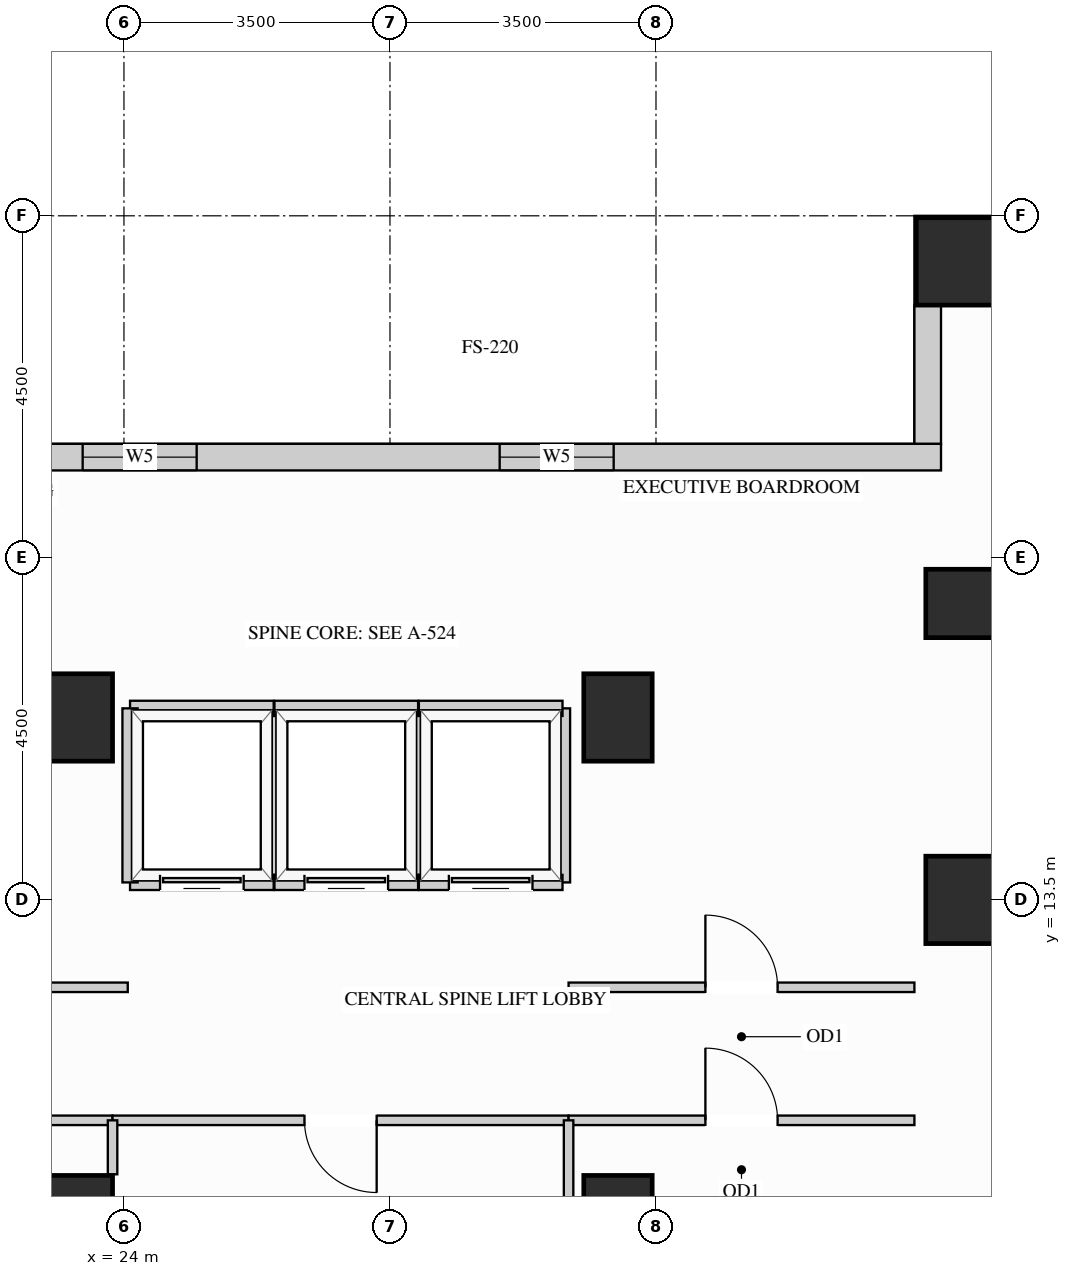
"""IFC4 building model, lengths in metres.
Left out: names, types, materials, properties, quantities, classifications, styles, units other than length and angle.
Written with IfcOpenShell. Run it as: python <this file> out.ifc"""

import sys

from ifc_helpers import new_model, si_unit, direction, frame, frame_2d, origin, origin_2d, place, context, subcontext, project, spatial, rectangle, extrude, source, transform, mapped, element, fill, save


model = new_model("IFC4")
c1 = context("Model", 3, precision=1e-05, world=origin(), true_north=direction((0.0, 1.0)))
c2 = subcontext(c1, "Body", "Model", "MODEL_VIEW")
j1 = project(units=[si_unit("LENGTHUNIT", "METRE"), si_unit("PLANEANGLEUNIT", "RADIAN")], contexts=[c1])
p1 = place(None, origin())
s1 = spatial("IfcSite", under=j1, at=p1, CompositionType="ELEMENT")
p2 = place(p1, origin())
s2 = spatial("IfcBuilding", under=s1, at=p2, CompositionType="ELEMENT")
p3 = place(p2, frame((0.0, 0.0, 113.4)))
s3 = spatial("IfcBuildingStorey", under=s2, at=p3, CompositionType="ELEMENT", Elevation=113.4)
m1 = source(origin(), c2, "Body", "SweptSolid", [
    extrude(rectangle(XDim=0.9, YDim=0.9, at=origin_2d()), origin(), (0.0, 0.0, 1.0), 3.38),
])
p4 = place(p3, frame((35.0, 17.4, 0.0), z_axis=(0.0, 0.0, 1.0), x_axis=(1.0, 0.0, 0.0)))
e1 = element("IfcColumn", 1, at=p4, inside=s3, PredefinedType="COLUMN", context=c2, shape_type="MappedRepresentation", body=[
    mapped(m1, transform((0.0, 0.0, 0.0), x_axis=(1.0, 0.0, 0.0), y_axis=(0.0, 1.0, 0.0), z_axis=(0.0, 0.0, 1.0))),
])
m2 = source(origin(), c2, "Body", "SweptSolid", [
    extrude(rectangle(XDim=0.9, YDim=1.15, at=origin_2d()), origin(), (0.0, 0.0, 1.0), 3.38),
])
for number, where, z_axis, x_axis in (
    (2, (35.0, 13.5, 0.0), (0.0, 0.0, 1.0), (1.0, 0.0, 0.0)),
    (3, (23.4, 15.9, 0.0), (0.0, 0.0, 1.0), (1.0, 0.0, 0.0)),
    (4, (23.4, 9.3, 0.0), (0.0, 0.0, 1.0), (1.0, 0.0, 0.0)),
    (5, (30.5, 15.9, 0.0), (0.0, 0.0, 1.0), (1.0, 0.0, 0.0)),
    (6, (30.5, 9.3, 0.0), (0.0, 0.0, 1.0), (1.0, 0.0, 0.0)),
):
    element("IfcColumn", number, at=place(p3, frame(where, z_axis=z_axis, x_axis=x_axis)), inside=s3, PredefinedType="COLUMN", context=c2, shape_type="MappedRepresentation", body=[
        mapped(m2, transform((0.0, 0.0, 0.0), x_axis=(1.0, 0.0, 0.0), y_axis=(0.0, 1.0, 0.0), z_axis=(0.0, 0.0, 1.0))),
    ])
m3 = source(origin(), c2, "Body", "SweptSolid", [
    extrude(rectangle(XDim=1.15, YDim=1.15, at=origin_2d()), origin(), (0.0, 0.0, 1.0), 3.38),
])
p5 = place(p3, frame((35.0, 21.9, 0.0), z_axis=(0.0, 0.0, 1.0), x_axis=(1.0, 0.0, 0.0)))
e7 = element("IfcColumn", 7, at=p5, inside=s3, PredefinedType="COLUMN", context=c2, shape_type="MappedRepresentation", body=[
    mapped(m3, transform((0.0, 0.0, 0.0), x_axis=(1.0, 0.0, 0.0), y_axis=(0.0, 1.0, 0.0), z_axis=(0.0, 0.0, 1.0))),
])
m4 = source(origin(), c2, "Body", "SweptSolid", [
    extrude(rectangle(XDim=1.829, YDim=0.35, at=frame_2d((0.915, 0.0))), origin(), (0.0, 0.0, 1.0), 3.365),
])
p6 = place(p3, frame((34.575, 21.327, 0.0), z_axis=(0.0, 0.0, 1.0), x_axis=(0.0, -1.0, 0.0)))
e8 = element("IfcWall", 8, at=p6, inside=s3, PredefinedType="SOLIDWALL", context=c2, shape_type="MappedRepresentation", body=[
    mapped(m4, transform((0.0, 0.0, 0.0), x_axis=(1.0, 0.0, 0.0), y_axis=(0.0, 1.0, 0.0), z_axis=(0.0, 0.0, 1.0))),
])
p7 = place(p3, frame((34.75, 19.325, 0.0), z_axis=(0.0, 0.0, 1.0), x_axis=(-1.0, 0.0, 0.0)))
e9 = element("IfcWall", 9, at=p7, inside=s3, PredefinedType="SOLIDWALL", context=c2, shape_type="SweptSolid", body=[
    extrude(rectangle(XDim=15.6, YDim=0.35, at=frame_2d((7.8, 0.0))), origin(), (0.0, 0.0, 1.0), 3.365),
])
p8 = place(p7, frame((4.307, 0.0, 0.78)))
e10 = element("IfcOpeningElement", 10, at=p8, cuts=e9, PredefinedType="OPENING", context=c2, shape_type="SweptSolid", body=[
    extrude(rectangle(XDim=1.5, YDim=2.0, at=frame_2d((0.75, 1.0))), frame((0.0, 0.185, 0.0), z_axis=(0.0, -1.0, 0.0), x_axis=(1.0, 0.0, 0.0)), (0.0, 0.0, 1.0), 0.37),
])
p9 = place(p7, frame((9.793, 0.0, 0.78)))
e11 = element("IfcOpeningElement", 11, at=p9, cuts=e9, PredefinedType="OPENING", context=c2, shape_type="SweptSolid", body=[
    extrude(rectangle(XDim=1.5, YDim=2.0, at=frame_2d((0.75, 1.0))), frame((0.0, 0.185, 0.0), z_axis=(0.0, -1.0, 0.0), x_axis=(1.0, 0.0, 0.0)), (0.0, 0.0, 1.0), 0.37),
])
p10 = place(p3, frame((29.85, 12.35, 0.0), z_axis=(0.0, 0.0, 1.0), x_axis=(1.0, 0.0, 0.0)))
e12 = element("IfcWall", 12, at=p10, inside=s3, PredefinedType="PARTITIONING", context=c2, shape_type="SweptSolid", body=[
    extrude(rectangle(XDim=4.55, YDim=0.125, at=frame_2d((2.275, 0.0))), origin(), (0.0, 0.0, 1.0), 3.365),
])
p11 = place(p10, frame((1.8, 0.0, 0.0)))
e13 = element("IfcOpeningElement", 13, at=p11, cuts=e12, PredefinedType="OPENING", context=c2, shape_type="SweptSolid", body=[
    extrude(rectangle(XDim=0.95, YDim=2.15, at=frame_2d((0.475, 1.075))), frame((0.0, 0.073, 0.0), z_axis=(0.0, -1.0, 0.0), x_axis=(1.0, 0.0, 0.0)), (0.0, 0.0, 1.0), 0.145),
])
p12 = place(p3, frame((19.5, 12.35, 0.0), z_axis=(0.0, 0.0, 1.0), x_axis=(1.0, 0.0, 0.0)))
e14 = element("IfcWall", 14, at=p12, inside=s3, PredefinedType="PARTITIONING", context=c2, shape_type="SweptSolid", body=[
    extrude(rectangle(XDim=4.55, YDim=0.125, at=frame_2d((2.275, 0.0))), origin(), (0.0, 0.0, 1.0), 3.365),
])
p13 = place(p12, frame((1.8, 0.0, 0.0)))
e15 = element("IfcOpeningElement", 15, at=p13, cuts=e14, PredefinedType="OPENING", context=c2, shape_type="SweptSolid", body=[
    extrude(rectangle(XDim=0.95, YDim=2.15, at=frame_2d((0.475, 1.075))), frame((0.0, 0.073, 0.0), z_axis=(0.0, -1.0, 0.0), x_axis=(1.0, 0.0, 0.0)), (0.0, 0.0, 1.0), 0.145),
])
p14 = place(p3, frame((19.5, 10.6, 0.0), z_axis=(0.0, 0.0, 1.0), x_axis=(1.0, 0.0, 0.0)))
e16 = element("IfcWall", 16, at=p14, inside=s3, PredefinedType="PARTITIONING", context=c2, shape_type="SweptSolid", body=[
    extrude(rectangle(XDim=4.35, YDim=0.125, at=frame_2d((2.175, 0.0))), origin(), (0.0, 0.0, 1.0), 3.365),
])
p15 = place(p14, frame((1.7, 0.0, 0.0)))
e17 = element("IfcOpeningElement", 17, at=p15, cuts=e16, PredefinedType="OPENING", context=c2, shape_type="SweptSolid", body=[
    extrude(rectangle(XDim=0.95, YDim=2.15, at=frame_2d((0.475, 1.075))), frame((0.0, 0.073, 0.0), z_axis=(0.0, -1.0, 0.0), x_axis=(1.0, 0.0, 0.0)), (0.0, 0.0, 1.0), 0.145),
])
p16 = place(p3, frame((23.85, 10.6, 0.0), z_axis=(0.0, 0.0, 1.0), x_axis=(1.0, 0.0, 0.0)))
e18 = element("IfcWall", 18, at=p16, inside=s3, PredefinedType="PARTITIONING", context=c2, shape_type="SweptSolid", body=[
    extrude(rectangle(XDim=6.0, YDim=0.125, at=frame_2d((3.0, 0.0))), origin(), (0.0, 0.0, 1.0), 3.365),
])
p17 = place(p16, frame((2.525, 0.0, 0.0)))
e19 = element("IfcOpeningElement", 19, at=p17, cuts=e18, PredefinedType="OPENING", context=c2, shape_type="SweptSolid", body=[
    extrude(rectangle(XDim=0.95, YDim=2.15, at=frame_2d((0.475, 1.075))), frame((0.0, 0.073, 0.0), z_axis=(0.0, -1.0, 0.0), x_axis=(1.0, 0.0, 0.0)), (0.0, 0.0, 1.0), 0.145),
])
p18 = place(p3, frame((29.85, 10.6, 0.0), z_axis=(0.0, 0.0, 1.0), x_axis=(1.0, 0.0, 0.0)))
e20 = element("IfcWall", 20, at=p18, inside=s3, PredefinedType="PARTITIONING", context=c2, shape_type="SweptSolid", body=[
    extrude(rectangle(XDim=4.55, YDim=0.125, at=frame_2d((2.275, 0.0))), origin(), (0.0, 0.0, 1.0), 3.365),
])
p19 = place(p18, frame((1.8, 0.0, 0.0)))
e21 = element("IfcOpeningElement", 21, at=p19, cuts=e20, PredefinedType="OPENING", context=c2, shape_type="SweptSolid", body=[
    extrude(rectangle(XDim=0.95, YDim=2.15, at=frame_2d((0.475, 1.075))), frame((0.0, 0.073, 0.0), z_axis=(0.0, -1.0, 0.0), x_axis=(1.0, 0.0, 0.0)), (0.0, 0.0, 1.0), 0.145),
])
m5 = source(origin(), c2, "Body", "SweptSolid", [
    extrude(rectangle(XDim=0.71, YDim=0.125, at=frame_2d((0.355, 0.0))), origin(), (0.0, 0.0, 1.0), 3.365),
])
p20 = place(p3, frame((23.85, 9.89, 0.0), z_axis=(0.0, 0.0, 1.0), x_axis=(0.0, 1.0, 0.0)))
e22 = element("IfcWall", 22, at=p20, inside=s3, PredefinedType="PARTITIONING", context=c2, shape_type="MappedRepresentation", body=[
    mapped(m5, transform((0.0, 0.0, 0.0), x_axis=(1.0, 0.0, 0.0), y_axis=(0.0, 1.0, 0.0), z_axis=(0.0, 0.0, 1.0))),
])
m6 = source(origin(), c2, "Body", "SweptSolid", [
    extrude(rectangle(XDim=1.748, YDim=0.125, at=frame_2d((0.874, 0.0))), origin(), (0.0, 0.0, 1.0), 3.365),
])
p21 = place(p3, frame((29.85, 8.852, 0.0), z_axis=(0.0, 0.0, 1.0), x_axis=(0.0, 1.0, 0.0)))
e23 = element("IfcWall", 23, at=p21, inside=s3, PredefinedType="PARTITIONING", context=c2, shape_type="MappedRepresentation", body=[
    mapped(m6, transform((0.0, 0.0, 0.0), x_axis=(1.0, 0.0, 0.0), y_axis=(0.0, 1.0, 0.0), z_axis=(0.0, 0.0, 1.0))),
])
m7 = source(origin(), c2, "Body", "SweptSolid", [
    extrude(rectangle(XDim=2.29, YDim=0.2, at=frame_2d((1.145, 0.0))), origin(), (0.0, 0.0, 1.0), 3.365),
])
p22 = place(p3, frame((25.97, 13.73, 0.0), z_axis=(0.0, 0.0, 1.0), x_axis=(0.0, 1.0, 0.0)))
e24 = element("IfcWall", 24, at=p22, inside=s3, PredefinedType="PARTITIONING", context=c2, shape_type="MappedRepresentation", body=[
    mapped(m7, transform((0.0, 0.0, 0.0), x_axis=(1.0, 0.0, 0.0), y_axis=(0.0, 1.0, 0.0), z_axis=(0.0, 0.0, 1.0))),
])
m8 = source(origin(), c2, "Body", "SweptSolid", [
    extrude(rectangle(XDim=1.89, YDim=0.2, at=frame_2d((0.945, 0.0))), origin(), (0.0, 0.0, 1.0), 2.677),
])
p23 = place(p3, frame((24.08, 16.02, 0.0), z_axis=(0.0, 0.0, 1.0), x_axis=(1.0, 0.0, 0.0)))
e25 = element("IfcWall", 25, at=p23, inside=s3, PredefinedType="PARTITIONING", context=c2, shape_type="MappedRepresentation", body=[
    mapped(m8, transform((0.0, 0.0, 0.0), x_axis=(1.0, 0.0, 0.0), y_axis=(0.0, 1.0, 0.0), z_axis=(0.0, 0.0, 1.0))),
])
p24 = place(p3, frame((24.08, 13.73, 0.0), z_axis=(0.0, 0.0, 1.0), x_axis=(1.0, 0.0, 0.0)))
e26 = element("IfcWall", 26, at=p24, inside=s3, PredefinedType="PARTITIONING", context=c2, shape_type="SweptSolid", body=[
    extrude(rectangle(XDim=1.89, YDim=0.2, at=frame_2d((0.945, 0.0))), origin(), (0.0, 0.0, 1.0), 2.446),
])
p25 = place(p24, frame((0.395, 0.0, 0.0)))
e27 = element("IfcOpeningElement", 27, at=p25, cuts=e26, PredefinedType="OPENING", context=c2, shape_type="SweptSolid", body=[
    extrude(rectangle(XDim=1.1, YDim=2.2, at=frame_2d((0.55, 1.1))), frame((0.0, 0.11, 0.0), z_axis=(0.0, -1.0, 0.0), x_axis=(1.0, 0.0, 0.0)), (0.0, 0.0, 1.0), 0.22),
])
for number, where, z_axis, x_axis in (
    (28, (24.08, 13.73, 0.0), (0.0, 0.0, 1.0), (0.0, 1.0, 0.0)),
    (29, (27.87, 13.73, 0.0), (0.0, 0.0, 1.0), (0.0, 1.0, 0.0)),
):
    element("IfcWall", number, at=place(p3, frame(where, z_axis=z_axis, x_axis=x_axis)), inside=s3, PredefinedType="PARTITIONING", context=c2, shape_type="MappedRepresentation", body=[
        mapped(m7, transform((0.0, 0.0, 0.0), x_axis=(1.0, 0.0, 0.0), y_axis=(0.0, 1.0, 0.0), z_axis=(0.0, 0.0, 1.0))),
    ])
m9 = source(origin(), c2, "Body", "SweptSolid", [
    extrude(rectangle(XDim=1.89, YDim=0.2, at=frame_2d((0.945, 0.0))), origin(), (0.0, 0.0, 1.0), 2.677),
])
p26 = place(p3, frame((25.98, 16.02, 0.0), z_axis=(0.0, 0.0, 1.0), x_axis=(1.0, 0.0, 0.0)))
e30 = element("IfcWall", 30, at=p26, inside=s3, PredefinedType="PARTITIONING", context=c2, shape_type="MappedRepresentation", body=[
    mapped(m9, transform((0.0, 0.0, 0.0), x_axis=(1.0, 0.0, 0.0), y_axis=(0.0, 1.0, 0.0), z_axis=(0.0, 0.0, 1.0))),
])
p27 = place(p3, frame((25.98, 13.73, 0.0), z_axis=(0.0, 0.0, 1.0), x_axis=(1.0, 0.0, 0.0)))
e31 = element("IfcWall", 31, at=p27, inside=s3, PredefinedType="PARTITIONING", context=c2, shape_type="SweptSolid", body=[
    extrude(rectangle(XDim=1.89, YDim=0.2, at=frame_2d((0.945, 0.0))), origin(), (0.0, 0.0, 1.0), 2.446),
])
p28 = place(p27, frame((0.395, 0.0, 0.0)))
e32 = element("IfcOpeningElement", 32, at=p28, cuts=e31, PredefinedType="OPENING", context=c2, shape_type="SweptSolid", body=[
    extrude(rectangle(XDim=1.1, YDim=2.2, at=frame_2d((0.55, 1.1))), frame((0.0, 0.11, 0.0), z_axis=(0.0, -1.0, 0.0), x_axis=(1.0, 0.0, 0.0)), (0.0, 0.0, 1.0), 0.22),
])
p29 = place(p3, frame((29.77, 13.73, 0.0), z_axis=(0.0, 0.0, 1.0), x_axis=(0.0, 1.0, 0.0)))
e33 = element("IfcWall", 33, at=p29, inside=s3, PredefinedType="PARTITIONING", context=c2, shape_type="MappedRepresentation", body=[
    mapped(m7, transform((0.0, 0.0, 0.0), x_axis=(1.0, 0.0, 0.0), y_axis=(0.0, 1.0, 0.0), z_axis=(0.0, 0.0, 1.0))),
])
p30 = place(p3, frame((27.88, 16.02, 0.0), z_axis=(0.0, 0.0, 1.0), x_axis=(1.0, 0.0, 0.0)))
e34 = element("IfcWall", 34, at=p30, inside=s3, PredefinedType="PARTITIONING", context=c2, shape_type="MappedRepresentation", body=[
    mapped(m9, transform((0.0, 0.0, 0.0), x_axis=(1.0, 0.0, 0.0), y_axis=(0.0, 1.0, 0.0), z_axis=(0.0, 0.0, 1.0))),
])
p31 = place(p3, frame((27.88, 13.73, 0.0), z_axis=(0.0, 0.0, 1.0), x_axis=(1.0, 0.0, 0.0)))
e35 = element("IfcWall", 35, at=p31, inside=s3, PredefinedType="PARTITIONING", context=c2, shape_type="SweptSolid", body=[
    extrude(rectangle(XDim=1.89, YDim=0.2, at=frame_2d((0.945, 0.0))), origin(), (0.0, 0.0, 1.0), 2.446),
])
p32 = place(p31, frame((0.395, 0.0, 0.0)))
e36 = element("IfcOpeningElement", 36, at=p32, cuts=e35, PredefinedType="OPENING", context=c2, shape_type="SweptSolid", body=[
    extrude(rectangle(XDim=1.1, YDim=2.2, at=frame_2d((0.55, 1.1))), frame((0.0, 0.11, 0.0), z_axis=(0.0, -1.0, 0.0), x_axis=(1.0, 0.0, 0.0)), (0.0, 0.0, 1.0), 0.22),
])
m10 = source(origin(), c2, "Body", "SweptSolid", [
    extrude(rectangle(XDim=1.1, YDim=2.2, at=frame_2d((0.55, 1.1))), frame((0.0, 0.025, 0.0), z_axis=(0.0, -1.0, 0.0), x_axis=(1.0, 0.0, 0.0)), (0.0, 0.0, 1.0), 0.05),
])
p33 = place(p25, origin())
e37 = element("IfcDoor", 37, at=p33, inside=s3, OperationType="SLIDING_TO_LEFT", PredefinedType="DOOR", context=c2, shape_type="MappedRepresentation", body=[
    mapped(m10, transform((0.0, 0.0, 0.0), x_axis=(1.0, 0.0, 0.0), y_axis=(0.0, 1.0, 0.0), z_axis=(0.0, 0.0, 1.0))),
])
fill(e27, e37)
p34 = place(p28, origin())
e38 = element("IfcDoor", 38, at=p34, inside=s3, OperationType="SLIDING_TO_LEFT", PredefinedType="DOOR", context=c2, shape_type="MappedRepresentation", body=[
    mapped(m10, transform((0.0, 0.0, 0.0), x_axis=(1.0, 0.0, 0.0), y_axis=(0.0, 1.0, 0.0), z_axis=(0.0, 0.0, 1.0))),
])
fill(e32, e38)
p35 = place(p32, origin())
e39 = element("IfcDoor", 39, at=p35, inside=s3, OperationType="SLIDING_TO_LEFT", PredefinedType="DOOR", context=c2, shape_type="MappedRepresentation", body=[
    mapped(m10, transform((0.0, 0.0, 0.0), x_axis=(1.0, 0.0, 0.0), y_axis=(0.0, 1.0, 0.0), z_axis=(0.0, 0.0, 1.0))),
])
fill(e36, e39)
m11 = source(origin(), c2, "Body", "SweptSolid", [
    extrude(rectangle(XDim=0.95, YDim=2.15, at=frame_2d((0.475, 1.075))), frame((0.0, 0.025, 0.0), z_axis=(0.0, -1.0, 0.0), x_axis=(1.0, 0.0, 0.0)), (0.0, 0.0, 1.0), 0.05),
])
p36 = place(p11, origin())
e40 = element("IfcDoor", 40, at=p36, inside=s3, OperationType="SINGLE_SWING_LEFT", PredefinedType="DOOR", context=c2, shape_type="MappedRepresentation", body=[
    mapped(m11, transform((0.0, 0.0, 0.0), x_axis=(1.0, 0.0, 0.0), y_axis=(0.0, 1.0, 0.0), z_axis=(0.0, 0.0, 1.0))),
])
fill(e13, e40)
p37 = place(p17, origin())
e41 = element("IfcDoor", 41, at=p37, inside=s3, OperationType="SINGLE_SWING_RIGHT", PredefinedType="DOOR", context=c2, shape_type="MappedRepresentation", body=[
    mapped(m11, transform((0.0, 0.0, 0.0), x_axis=(1.0, 0.0, 0.0), y_axis=(0.0, 1.0, 0.0), z_axis=(0.0, 0.0, 1.0))),
])
fill(e19, e41)
p38 = place(p19, origin())
e42 = element("IfcDoor", 42, at=p38, inside=s3, OperationType="SINGLE_SWING_LEFT", PredefinedType="DOOR", context=c2, shape_type="MappedRepresentation", body=[
    mapped(m11, transform((0.0, 0.0, 0.0), x_axis=(1.0, 0.0, 0.0), y_axis=(0.0, 1.0, 0.0), z_axis=(0.0, 0.0, 1.0))),
])
fill(e21, e42)
m12 = source(origin(), c2, "Body", "SweptSolid", [
    extrude(rectangle(XDim=1.5, YDim=2.0, at=frame_2d((0.75, 1.0))), frame((0.0, 0.03, 0.0), z_axis=(0.0, -1.0, 0.0), x_axis=(1.0, 0.0, 0.0)), (0.0, 0.0, 1.0), 0.06),
])
p39 = place(p8, origin())
e43 = element("IfcWindow", 43, at=p39, inside=s3, PartitioningType="SINGLE_PANEL", PredefinedType="WINDOW", context=c2, shape_type="MappedRepresentation", body=[
    mapped(m12, transform((0.0, 0.0, 0.0), x_axis=(1.0, 0.0, 0.0), y_axis=(0.0, 1.0, 0.0), z_axis=(0.0, 0.0, 1.0))),
])
fill(e10, e43)
p40 = place(p9, origin())
e44 = element("IfcWindow", 44, at=p40, inside=s3, PartitioningType="SINGLE_PANEL", PredefinedType="WINDOW", context=c2, shape_type="MappedRepresentation", body=[
    mapped(m12, transform((0.0, 0.0, 0.0), x_axis=(1.0, 0.0, 0.0), y_axis=(0.0, 1.0, 0.0), z_axis=(0.0, 0.0, 1.0))),
])
fill(e11, e44)
save(model, sys.argv[1])
